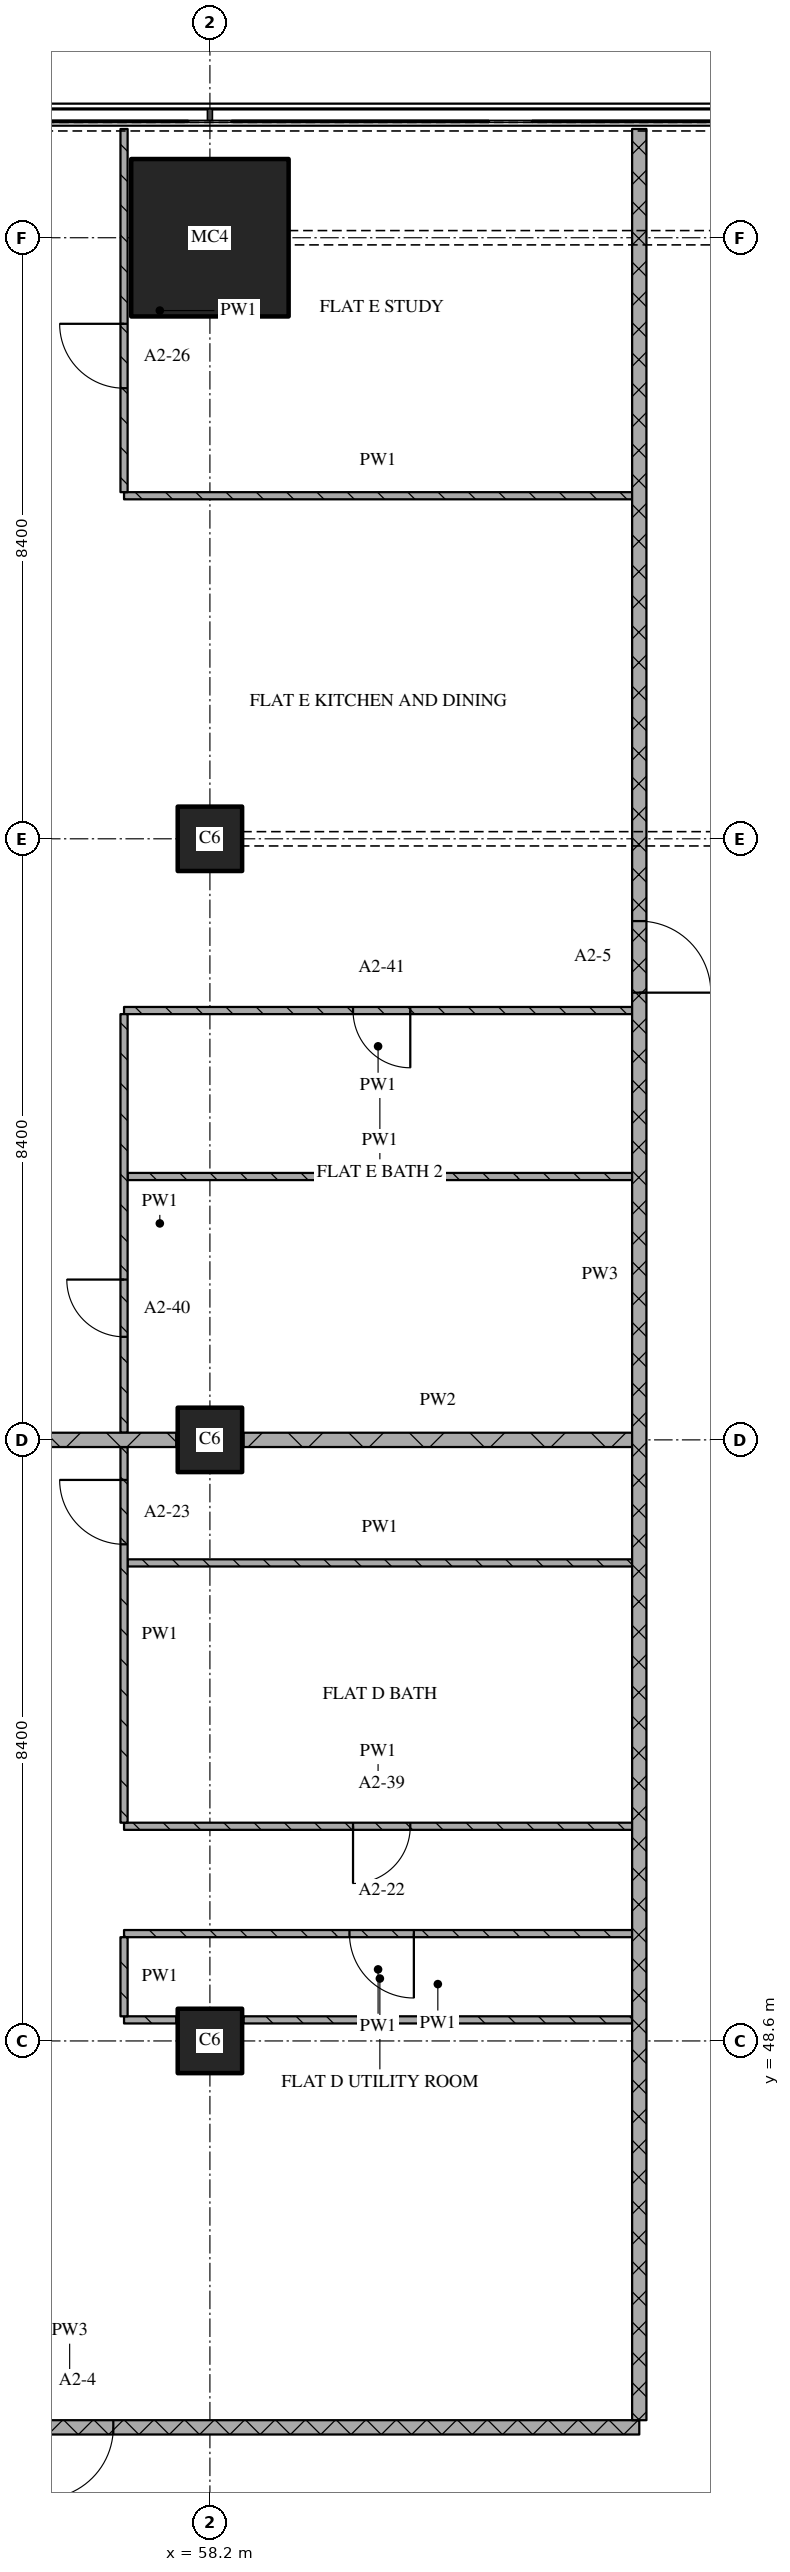
"""IFC4 building model, lengths in metres.
Left out: names, types, materials, properties, quantities, classifications, styles, units other than length and angle.
Written with IfcOpenShell. Run it as: python <this file> out.ifc"""

import sys

from ifc_helpers import new_model, si_unit, direction, frame, frame_2d, origin, origin_2d, place, context, subcontext, project, spatial, rectangle, extrude, element, fill, save


model = new_model("IFC4")
c1 = context("Model", 3, precision=1e-05, world=origin(), true_north=direction((0.0, 1.0)))
c2 = subcontext(c1, "Body", "Model", "MODEL_VIEW")
j1 = project(units=[si_unit("LENGTHUNIT", "METRE"), si_unit("PLANEANGLEUNIT", "RADIAN")], contexts=[c1])
p1 = place(None, origin())
s1 = spatial("IfcSite", under=j1, at=p1, CompositionType="ELEMENT")
p2 = place(p1, origin())
s2 = spatial("IfcBuilding", under=s1, at=p2, CompositionType="ELEMENT")
p3 = place(p2, frame((0.0, 0.0, 48.0)))
s3 = spatial("IfcBuildingStorey", under=s2, at=p3, CompositionType="ELEMENT", Elevation=48.0)
for number, where, z_axis, x_axis in (
    (1, (58.2, 48.6, 0.0), (0.0, 0.0, 1.0), (1.0, 0.0, 0.0)),
    (2, (58.2, 57.0, 0.0), (0.0, 0.0, 1.0), (1.0, 0.0, 0.0)),
    (3, (58.2, 65.4, 0.0), (0.0, 0.0, 1.0), (1.0, 0.0, 0.0)),
):
    element("IfcColumn", number, at=place(p3, frame(where, z_axis=z_axis, x_axis=x_axis)), inside=s3, PredefinedType="COLUMN", context=c2, shape_type="SweptSolid", body=[
        extrude(rectangle(XDim=0.9, YDim=0.9, at=origin_2d()), origin(), (0.0, 0.0, 1.0), 3.6),
    ])
p4 = place(p3, frame((58.2, 73.8, 0.0), z_axis=(0.0, 0.0, 1.0), x_axis=(1.0, 0.0, 0.0)))
e4 = element("IfcColumn", 4, at=p4, inside=s3, PredefinedType="COLUMN", context=c2, shape_type="SweptSolid", body=[
    extrude(rectangle(XDim=2.2, YDim=2.2, at=origin_2d()), origin(), (0.0, 0.0, 1.0), 3.6),
])
p5 = place(p3, frame((48.28, 43.2, 0.0), z_axis=(0.0, 0.0, 1.0), x_axis=(1.0, 0.0, 0.0)))
e5 = element("IfcWall", 5, at=p5, inside=s3, PredefinedType="PARTITIONING", context=c2, shape_type="SweptSolid", body=[
    extrude(rectangle(XDim=15.92, YDim=0.2, at=frame_2d((7.96, 0.0))), origin(), (0.0, 0.0, 1.0), 3.32),
])
p6 = place(p5, frame((7.57, 0.0, 0.0)))
e6 = element("IfcOpeningElement", 6, at=p6, cuts=e5, PredefinedType="OPENING", context=c2, shape_type="SweptSolid", body=[
    extrude(rectangle(XDim=1.0, YDim=2.1, at=frame_2d((0.5, 1.05))), frame((0.0, 0.11, 0.0), z_axis=(0.0, -1.0, 0.0), x_axis=(1.0, 0.0, 0.0)), (0.0, 0.0, 1.0), 0.22),
])
p7 = place(p3, frame((57.0, 48.894, 0.0), z_axis=(0.0, 0.0, 1.0), x_axis=(1.0, 0.0, 0.0)))
e7 = element("IfcWall", 7, at=p7, inside=s3, PredefinedType="PARTITIONING", context=c2, shape_type="SweptSolid", body=[
    extrude(rectangle(XDim=0.73, YDim=0.1, at=frame_2d((0.365, 0.0))), origin(), (0.0, 0.0, 1.0), 3.32),
])
p8 = place(p3, frame((58.67, 48.894, 0.0), z_axis=(0.0, 0.0, 1.0), x_axis=(1.0, 0.0, 0.0)))
e8 = element("IfcWall", 8, at=p8, inside=s3, PredefinedType="PARTITIONING", context=c2, shape_type="SweptSolid", body=[
    extrude(rectangle(XDim=5.43, YDim=0.1, at=frame_2d((2.715, 0.0))), origin(), (0.0, 0.0, 1.0), 3.32),
])
p9 = place(p3, frame((64.1, 50.1, 0.0), z_axis=(0.0, 0.0, 1.0), x_axis=(-1.0, 0.0, 0.0)))
e9 = element("IfcWall", 9, at=p9, inside=s3, PredefinedType="PARTITIONING", context=c2, shape_type="SweptSolid", body=[
    extrude(rectangle(XDim=7.1, YDim=0.1, at=frame_2d((3.55, 0.0))), origin(), (0.0, 0.0, 1.0), 3.32),
])
p10 = place(p9, frame((3.05, 0.0, 0.0)))
e10 = element("IfcOpeningElement", 10, at=p10, cuts=e9, PredefinedType="OPENING", context=c2, shape_type="SweptSolid", body=[
    extrude(rectangle(XDim=0.9, YDim=2.1, at=frame_2d((0.45, 1.05))), frame((0.0, 0.06, 0.0), z_axis=(0.0, -1.0, 0.0), x_axis=(1.0, 0.0, 0.0)), (0.0, 0.0, 1.0), 0.12),
])
p11 = place(p3, frame((57.0, 51.6, 0.0), z_axis=(0.0, 0.0, 1.0), x_axis=(1.0, 0.0, 0.0)))
e11 = element("IfcWall", 11, at=p11, inside=s3, PredefinedType="PARTITIONING", context=c2, shape_type="SweptSolid", body=[
    extrude(rectangle(XDim=7.1, YDim=0.1, at=frame_2d((3.55, 0.0))), origin(), (0.0, 0.0, 1.0), 3.32),
])
p12 = place(p11, frame((3.2, 0.0, 0.0)))
e12 = element("IfcOpeningElement", 12, at=p12, cuts=e11, PredefinedType="OPENING", context=c2, shape_type="SweptSolid", body=[
    extrude(rectangle(XDim=0.8, YDim=2.1, at=frame_2d((0.4, 1.05))), frame((0.0, 0.06, 0.0), z_axis=(0.0, -1.0, 0.0), x_axis=(1.0, 0.0, 0.0)), (0.0, 0.0, 1.0), 0.12),
])
p13 = place(p3, frame((57.05, 55.281, 0.0), z_axis=(0.0, 0.0, 1.0), x_axis=(1.0, 0.0, 0.0)))
e13 = element("IfcWall", 13, at=p13, inside=s3, PredefinedType="PARTITIONING", context=c2, shape_type="SweptSolid", body=[
    extrude(rectangle(XDim=7.05, YDim=0.1, at=frame_2d((3.525, 0.0))), origin(), (0.0, 0.0, 1.0), 3.32),
])
p14 = place(p3, frame((50.27, 57.0, 0.0), z_axis=(0.0, 0.0, 1.0), x_axis=(1.0, 0.0, 0.0)))
e14 = element("IfcWall", 14, at=p14, inside=s3, PredefinedType="PARTITIONING", context=c2, shape_type="SweptSolid", body=[
    extrude(rectangle(XDim=7.46, YDim=0.2, at=frame_2d((3.73, 0.0))), origin(), (0.0, 0.0, 1.0), 3.32),
])
p15 = place(p3, frame((58.67, 57.0, 0.0), z_axis=(0.0, 0.0, 1.0), x_axis=(1.0, 0.0, 0.0)))
e15 = element("IfcWall", 15, at=p15, inside=s3, PredefinedType="PARTITIONING", context=c2, shape_type="SweptSolid", body=[
    extrude(rectangle(XDim=5.43, YDim=0.2, at=frame_2d((2.715, 0.0))), origin(), (0.0, 0.0, 1.0), 3.32),
])
p16 = place(p3, frame((57.05, 60.681, 0.0), z_axis=(0.0, 0.0, 1.0), x_axis=(1.0, 0.0, 0.0)))
e16 = element("IfcWall", 16, at=p16, inside=s3, PredefinedType="PARTITIONING", context=c2, shape_type="SweptSolid", body=[
    extrude(rectangle(XDim=7.05, YDim=0.1, at=frame_2d((3.525, 0.0))), origin(), (0.0, 0.0, 1.0), 3.32),
])
p17 = place(p3, frame((64.1, 63.0, 0.0), z_axis=(0.0, 0.0, 1.0), x_axis=(-1.0, 0.0, 0.0)))
e17 = element("IfcWall", 17, at=p17, inside=s3, PredefinedType="PARTITIONING", context=c2, shape_type="SweptSolid", body=[
    extrude(rectangle(XDim=7.1, YDim=0.1, at=frame_2d((3.55, 0.0))), origin(), (0.0, 0.0, 1.0), 3.32),
])
p18 = place(p17, frame((3.1, 0.0, 0.0)))
e18 = element("IfcOpeningElement", 18, at=p18, cuts=e17, PredefinedType="OPENING", context=c2, shape_type="SweptSolid", body=[
    extrude(rectangle(XDim=0.8, YDim=2.1, at=frame_2d((0.4, 1.05))), frame((0.0, 0.06, 0.0), z_axis=(0.0, -1.0, 0.0), x_axis=(1.0, 0.0, 0.0)), (0.0, 0.0, 1.0), 0.12),
])
p19 = place(p3, frame((57.0, 70.194, 0.0), z_axis=(0.0, 0.0, 1.0), x_axis=(1.0, 0.0, 0.0)))
e19 = element("IfcWall", 19, at=p19, inside=s3, PredefinedType="PARTITIONING", context=c2, shape_type="SweptSolid", body=[
    extrude(rectangle(XDim=7.1, YDim=0.1, at=frame_2d((3.55, 0.0))), origin(), (0.0, 0.0, 1.0), 3.32),
])
p20 = place(p3, frame((57.0, 50.05, 0.0), z_axis=(0.0, 0.0, 1.0), x_axis=(0.0, -1.0, 0.0)))
e20 = element("IfcWall", 20, at=p20, inside=s3, PredefinedType="PARTITIONING", context=c2, shape_type="SweptSolid", body=[
    extrude(rectangle(XDim=1.106, YDim=0.1, at=frame_2d((0.553, 0.0))), origin(), (0.0, 0.0, 1.0), 3.32),
])
p21 = place(p3, frame((57.0, 75.32, 0.0), z_axis=(0.0, 0.0, 1.0), x_axis=(0.0, -1.0, 0.0)))
e21 = element("IfcWall", 21, at=p21, inside=s3, PredefinedType="PARTITIONING", context=c2, shape_type="SweptSolid", body=[
    extrude(rectangle(XDim=5.076, YDim=0.1, at=frame_2d((2.538, 0.0))), origin(), (0.0, 0.0, 1.0), 3.32),
])
p22 = place(p21, frame((2.723, 0.0, 0.0)))
e22 = element("IfcOpeningElement", 22, at=p22, cuts=e21, PredefinedType="OPENING", context=c2, shape_type="SweptSolid", body=[
    extrude(rectangle(XDim=0.9, YDim=2.1, at=frame_2d((0.45, 1.05))), frame((0.0, 0.06, 0.0), z_axis=(0.0, -1.0, 0.0), x_axis=(1.0, 0.0, 0.0)), (0.0, 0.0, 1.0), 0.12),
])
p23 = place(p3, frame((64.2, 43.3, 0.0), z_axis=(0.0, 0.0, 1.0), x_axis=(0.0, 1.0, 0.0)))
e23 = element("IfcWall", 23, at=p23, inside=s3, PredefinedType="PARTITIONING", context=c2, shape_type="SweptSolid", body=[
    extrude(rectangle(XDim=32.02, YDim=0.2, at=frame_2d((16.01, 0.0))), origin(), (0.0, 0.0, 1.0), 3.32),
])
p24 = place(p23, frame((19.95, 0.0, 0.0)))
e24 = element("IfcOpeningElement", 24, at=p24, cuts=e23, PredefinedType="OPENING", context=c2, shape_type="SweptSolid", body=[
    extrude(rectangle(XDim=1.0, YDim=2.1, at=frame_2d((0.5, 1.05))), frame((0.0, 0.11, 0.0), z_axis=(0.0, -1.0, 0.0), x_axis=(1.0, 0.0, 0.0)), (0.0, 0.0, 1.0), 0.22),
])
p25 = place(p3, frame((57.0, 56.9, 0.0), z_axis=(0.0, 0.0, 1.0), x_axis=(0.0, -1.0, 0.0)))
e25 = element("IfcWall", 25, at=p25, inside=s3, PredefinedType="PARTITIONING", context=c2, shape_type="SweptSolid", body=[
    extrude(rectangle(XDim=5.25, YDim=0.1, at=frame_2d((2.625, 0.0))), origin(), (0.0, 0.0, 1.0), 3.32),
])
p26 = place(p25, frame((0.46, 0.0, 0.0)))
e26 = element("IfcOpeningElement", 26, at=p26, cuts=e25, PredefinedType="OPENING", context=c2, shape_type="SweptSolid", body=[
    extrude(rectangle(XDim=0.9, YDim=2.1, at=frame_2d((0.45, 1.05))), frame((0.0, 0.06, 0.0), z_axis=(0.0, -1.0, 0.0), x_axis=(1.0, 0.0, 0.0)), (0.0, 0.0, 1.0), 0.12),
])
p27 = place(p3, frame((57.0, 62.95, 0.0), z_axis=(0.0, 0.0, 1.0), x_axis=(0.0, -1.0, 0.0)))
e27 = element("IfcWall", 27, at=p27, inside=s3, PredefinedType="PARTITIONING", context=c2, shape_type="SweptSolid", body=[
    extrude(rectangle(XDim=5.85, YDim=0.1, at=frame_2d((2.925, 0.0))), origin(), (0.0, 0.0, 1.0), 3.32),
])
p28 = place(p27, frame((3.71, 0.0, 0.0)))
e28 = element("IfcOpeningElement", 28, at=p28, cuts=e27, PredefinedType="OPENING", context=c2, shape_type="SweptSolid", body=[
    extrude(rectangle(XDim=0.8, YDim=2.1, at=frame_2d((0.4, 1.05))), frame((0.0, 0.06, 0.0), z_axis=(0.0, -1.0, 0.0), x_axis=(1.0, 0.0, 0.0)), (0.0, 0.0, 1.0), 0.12),
])
p29 = place(p6, origin())
e29 = element("IfcDoor", 29, at=p29, inside=s3, OperationType="SINGLE_SWING_RIGHT", PredefinedType="DOOR", context=c2, shape_type="SweptSolid", body=[
    extrude(rectangle(XDim=1.0, YDim=2.1, at=frame_2d((0.5, 1.05))), frame((0.0, 0.025, 0.0), z_axis=(0.0, -1.0, 0.0), x_axis=(1.0, 0.0, 0.0)), (0.0, 0.0, 1.0), 0.05),
])
fill(e6, e29)
p30 = place(p10, origin())
e30 = element("IfcDoor", 30, at=p30, inside=s3, OperationType="SINGLE_SWING_LEFT", PredefinedType="DOOR", context=c2, shape_type="SweptSolid", body=[
    extrude(rectangle(XDim=0.9, YDim=2.1, at=frame_2d((0.45, 1.05))), frame((0.0, 0.025, 0.0), z_axis=(0.0, -1.0, 0.0), x_axis=(1.0, 0.0, 0.0)), (0.0, 0.0, 1.0), 0.05),
])
fill(e10, e30)
p31 = place(p12, origin())
e31 = element("IfcDoor", 31, at=p31, inside=s3, OperationType="SINGLE_SWING_RIGHT", PredefinedType="DOOR", context=c2, shape_type="SweptSolid", body=[
    extrude(rectangle(XDim=0.8, YDim=2.1, at=frame_2d((0.4, 1.05))), frame((0.0, 0.025, 0.0), z_axis=(0.0, -1.0, 0.0), x_axis=(1.0, 0.0, 0.0)), (0.0, 0.0, 1.0), 0.05),
])
fill(e12, e31)
p32 = place(p18, origin())
e32 = element("IfcDoor", 32, at=p32, inside=s3, OperationType="SINGLE_SWING_LEFT", PredefinedType="DOOR", context=c2, shape_type="SweptSolid", body=[
    extrude(rectangle(XDim=0.8, YDim=2.1, at=frame_2d((0.4, 1.05))), frame((0.0, 0.025, 0.0), z_axis=(0.0, -1.0, 0.0), x_axis=(1.0, 0.0, 0.0)), (0.0, 0.0, 1.0), 0.05),
])
fill(e18, e32)
p33 = place(p22, origin())
e33 = element("IfcDoor", 33, at=p33, inside=s3, OperationType="SINGLE_SWING_RIGHT", PredefinedType="DOOR", context=c2, shape_type="SweptSolid", body=[
    extrude(rectangle(XDim=0.9, YDim=2.1, at=frame_2d((0.45, 1.05))), frame((0.0, 0.025, 0.0), z_axis=(0.0, -1.0, 0.0), x_axis=(1.0, 0.0, 0.0)), (0.0, 0.0, 1.0), 0.05),
])
fill(e22, e33)
p34 = place(p24, origin())
e34 = element("IfcDoor", 34, at=p34, inside=s3, OperationType="SINGLE_SWING_RIGHT", PredefinedType="DOOR", context=c2, shape_type="SweptSolid", body=[
    extrude(rectangle(XDim=1.0, YDim=2.1, at=frame_2d((0.5, 1.05))), frame((0.0, 0.025, 0.0), z_axis=(0.0, -1.0, 0.0), x_axis=(1.0, 0.0, 0.0)), (0.0, 0.0, 1.0), 0.05),
])
fill(e24, e34)
p35 = place(p26, origin())
e35 = element("IfcDoor", 35, at=p35, inside=s3, OperationType="SINGLE_SWING_RIGHT", PredefinedType="DOOR", context=c2, shape_type="SweptSolid", body=[
    extrude(rectangle(XDim=0.9, YDim=2.1, at=frame_2d((0.45, 1.05))), frame((0.0, 0.025, 0.0), z_axis=(0.0, -1.0, 0.0), x_axis=(1.0, 0.0, 0.0)), (0.0, 0.0, 1.0), 0.05),
])
fill(e26, e35)
p36 = place(p28, origin())
e36 = element("IfcDoor", 36, at=p36, inside=s3, OperationType="SINGLE_SWING_RIGHT", PredefinedType="DOOR", context=c2, shape_type="SweptSolid", body=[
    extrude(rectangle(XDim=0.8, YDim=2.1, at=frame_2d((0.4, 1.05))), frame((0.0, 0.025, 0.0), z_axis=(0.0, -1.0, 0.0), x_axis=(1.0, 0.0, 0.0)), (0.0, 0.0, 1.0), 0.05),
])
fill(e28, e36)
save(model, sys.argv[1])
